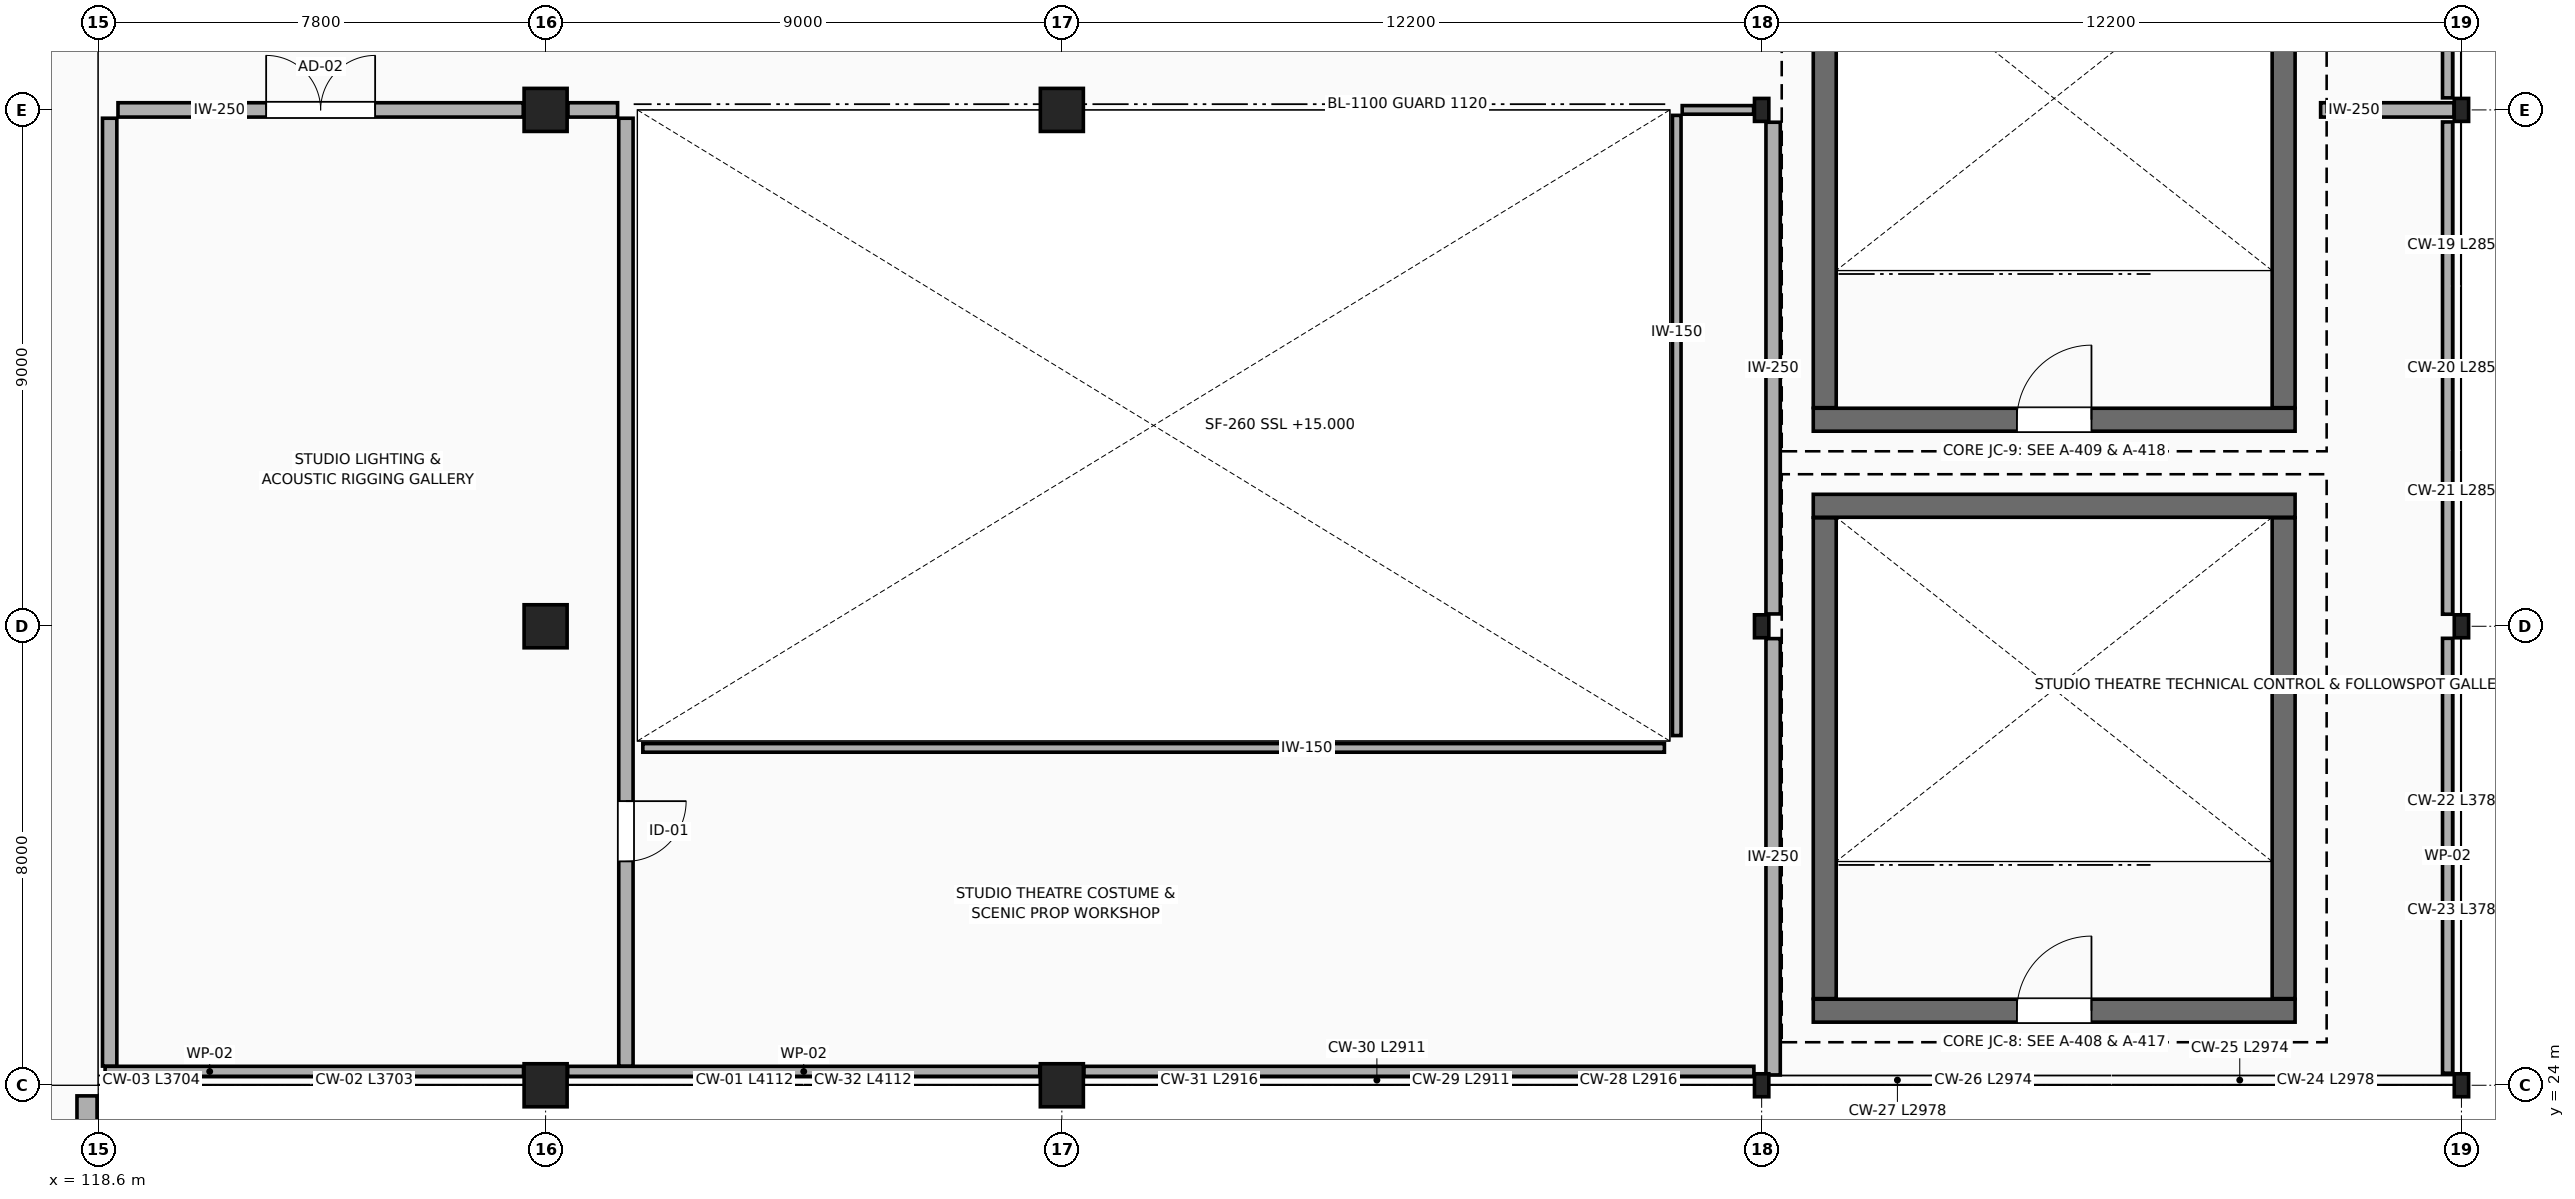
"""IFC4 building model, lengths in metres.
Left out: names, types, materials, properties, quantities, classifications, styles, units other than length and angle.
Written with IfcOpenShell. Run it as: python <this file> out.ifc"""

import sys

from ifc_helpers import new_model, si_unit, direction, frame, frame_2d, origin, origin_2d, place, context, subcontext, project, spatial, rectangle, i_section, extrude, element, fill, save


model = new_model("IFC4")
c1 = context("Model", 3, precision=1e-05, world=origin(), true_north=direction((0.0, 1.0)))
c2 = subcontext(c1, "Body", "Model", "MODEL_VIEW")
j1 = project(units=[si_unit("LENGTHUNIT", "METRE"), si_unit("PLANEANGLEUNIT", "RADIAN")], contexts=[c1])
p1 = place(None, origin())
s1 = spatial("IfcSite", under=j1, at=p1, CompositionType="ELEMENT")
p2 = place(p1, origin())
s2 = spatial("IfcBuilding", under=s1, at=p2, CompositionType="ELEMENT")
p3 = place(p2, frame((0.0, 0.0, 15.0)))
s3 = spatial("IfcBuildingStorey", under=s2, at=p3, CompositionType="ELEMENT", Elevation=15.0)
for number, where, z_axis, x_axis in (
    (1, (126.4, 24.0, 0.0), (0.0, 0.0, 1.0), (1.0, 0.0, 0.0)),
    (2, (126.4, 32.0, 0.0), (0.0, 0.0, 1.0), (1.0, 0.0, 0.0)),
):
    element("IfcColumn", number, at=place(p3, frame(where, z_axis=z_axis, x_axis=x_axis)), inside=s3, PredefinedType="COLUMN", context=c2, shape_type="SweptSolid", body=[
        extrude(rectangle(XDim=0.75, YDim=0.75, at=origin_2d()), origin(), (0.0, 0.0, 1.0), 4.76),
    ])
for number, where, z_axis, x_axis in (
    (3, (126.4, 41.0, 0.0), (0.0, 0.0, 1.0), (1.0, 0.0, 0.0)),
    (4, (135.4, 24.0, 0.0), (0.0, 0.0, 1.0), (1.0, 0.0, 0.0)),
    (5, (135.4, 41.0, 0.0), (0.0, 0.0, 1.0), (1.0, 0.0, 0.0)),
):
    element("IfcColumn", number, at=place(p3, frame(where, z_axis=z_axis, x_axis=x_axis)), inside=s3, PredefinedType="COLUMN", context=c2, shape_type="SweptSolid", body=[
        extrude(rectangle(XDim=0.75, YDim=0.75, at=origin_2d()), origin(), (0.0, 0.0, 1.0), 4.8),
    ])
for number, where, z_axis, x_axis in (
    (6, (147.6, 24.0, 0.0), (0.0, 0.0, 1.0), (1.0, 0.0, 0.0)),
    (7, (147.6, 32.0, 0.0), (0.0, 0.0, 1.0), (1.0, 0.0, 0.0)),
    (8, (147.6, 41.0, 0.0), (0.0, 0.0, 1.0), (1.0, 0.0, 0.0)),
):
    element("IfcColumn", number, at=place(p3, frame(where, z_axis=z_axis, x_axis=x_axis)), inside=s3, PredefinedType="COLUMN", context=c2, shape_type="SweptSolid", body=[
        extrude(i_section(OverallWidth=0.25, OverallDepth=0.4, WebThickness=0.01, FlangeThickness=0.013, FilletRadius=0.014, at=origin_2d()), origin(), (0.0, 0.0, 1.0), 4.8),
    ])
for number, where, z_axis, x_axis in (
    (9, (159.8, 24.0, 0.0), (0.0, 0.0, 1.0), (1.0, 0.0, 0.0)),
    (10, (159.8, 32.0, 0.0), (0.0, 0.0, 1.0), (1.0, 0.0, 0.0)),
    (11, (159.8, 41.0, 0.0), (0.0, 0.0, 1.0), (1.0, 0.0, 0.0)),
):
    element("IfcColumn", number, at=place(p3, frame(where, z_axis=z_axis, x_axis=x_axis)), inside=s3, PredefinedType="COLUMN", context=c2, shape_type="SweptSolid", body=[
        extrude(i_section(OverallWidth=0.25, OverallDepth=0.4, WebThickness=0.01, FlangeThickness=0.013, FilletRadius=0.014, at=origin_2d()), origin(), (0.0, 0.0, 1.0), 4.76),
    ])
for number, where, z_axis, x_axis in (
    (12, (159.56, 49.79, 0.0), (0.0, 0.0, 1.0), (0.0, -1.0, 0.0)),
    (13, (159.56, 40.79, 0.0), (0.0, 0.0, 1.0), (0.0, -1.0, 0.0)),
):
    element("IfcWall", number, at=place(p3, frame(where, z_axis=z_axis, x_axis=x_axis)), inside=s3, PredefinedType="PARAPET", context=c2, shape_type="SweptSolid", body=[
        extrude(rectangle(XDim=8.58, YDim=0.18, at=frame_2d((4.29, 0.0))), origin(), (0.0, 0.0, 1.0), 0.88),
    ])
p4 = place(p3, frame((159.56, 31.79, 0.0), z_axis=(0.0, 0.0, 1.0), x_axis=(0.0, -1.0, 0.0)))
e14 = element("IfcWall", 14, at=p4, inside=s3, PredefinedType="PARAPET", context=c2, shape_type="SweptSolid", body=[
    extrude(rectangle(XDim=7.58, YDim=0.18, at=frame_2d((3.79, 0.0))), origin(), (0.0, 0.0, 1.0), 0.88),
])
p5 = place(p3, frame((147.465, 24.24, 0.0), z_axis=(0.0, 0.0, 1.0), x_axis=(-1.0, 0.0, 0.0)))
e15 = element("IfcWall", 15, at=p5, inside=s3, PredefinedType="PARAPET", context=c2, shape_type="SweptSolid", body=[
    extrude(rectangle(XDim=11.68, YDim=0.18, at=frame_2d((5.84, 0.0))), origin(), (0.0, 0.0, 1.0), 0.88),
])
p6 = place(p3, frame((135.015, 24.24, 0.0), z_axis=(0.0, 0.0, 1.0), x_axis=(-1.0, 0.0, 0.0)))
e16 = element("IfcWall", 16, at=p6, inside=s3, PredefinedType="PARAPET", context=c2, shape_type="SweptSolid", body=[
    extrude(rectangle(XDim=8.23, YDim=0.18, at=frame_2d((4.115, 0.0))), origin(), (0.0, 0.0, 1.0), 0.88),
])
p7 = place(p3, frame((126.015, 24.24, 0.0), z_axis=(0.0, 0.0, 1.0), x_axis=(-1.0, 0.0, 0.0)))
e17 = element("IfcWall", 17, at=p7, inside=s3, PredefinedType="PARAPET", context=c2, shape_type="SweptSolid", body=[
    extrude(rectangle(XDim=7.295, YDim=0.18, at=frame_2d((3.647, 0.0))), origin(), (0.0, 0.0, 1.0), 0.88),
])
p8 = place(p3, frame((118.405, 23.815, 0.0), z_axis=(0.0, 0.0, 1.0), x_axis=(0.0, -1.0, 0.0)))
e18 = element("IfcWall", 18, at=p8, inside=s3, PredefinedType="STANDARD", context=c2, shape_type="SweptSolid", body=[
    extrude(rectangle(XDim=13.63, YDim=0.35, at=frame_2d((6.815, 0.0))), origin(), (0.0, 0.0, 1.0), 3.735),
])
p9 = place(p3, frame((148.5, 25.3, 0.0), z_axis=(0.0, 0.0, 1.0), x_axis=(1.0, 0.0, 0.0)))
e19 = element("IfcWall", 19, at=p9, inside=s3, PredefinedType="SHEAR", context=c2, shape_type="SweptSolid", body=[
    extrude(rectangle(XDim=8.4, YDim=0.4, at=frame_2d((4.2, 0.0))), origin(), (0.0, 0.0, 1.0), 4.58),
])
p10 = place(p9, frame((3.55, 0.0, 0.0)))
e20 = element("IfcOpeningElement", 20, at=p10, cuts=e19, PredefinedType="OPENING", context=c2, shape_type="SweptSolid", body=[
    extrude(rectangle(XDim=1.3, YDim=2.15, at=frame_2d((0.65, 1.075))), frame((0.0, 0.21, 0.0), z_axis=(0.0, -1.0, 0.0), x_axis=(1.0, 0.0, 0.0)), (0.0, 0.0, 1.0), 0.42),
])
p11 = place(p3, frame((156.9, 34.1, 0.0), z_axis=(0.0, 0.0, 1.0), x_axis=(-1.0, 0.0, 0.0)))
e21 = element("IfcWall", 21, at=p11, inside=s3, PredefinedType="SHEAR", context=c2, shape_type="SweptSolid", body=[
    extrude(rectangle(XDim=8.4, YDim=0.4, at=frame_2d((4.2, 0.0))), origin(), (0.0, 0.0, 1.0), 4.58),
])
for number, where, z_axis, x_axis in (
    (22, (156.7, 25.51, 0.0), (0.0, 0.0, 1.0), (0.0, 1.0, 0.0)),
    (23, (148.7, 33.89, 0.0), (0.0, 0.0, 1.0), (0.0, -1.0, 0.0)),
):
    element("IfcWall", number, at=place(p3, frame(where, z_axis=z_axis, x_axis=x_axis)), inside=s3, PredefinedType="SHEAR", context=c2, shape_type="SweptSolid", body=[
        extrude(rectangle(XDim=8.38, YDim=0.4, at=frame_2d((4.19, 0.0))), origin(), (0.0, 0.0, 1.0), 4.58),
    ])
p12 = place(p3, frame((148.5, 35.6, 0.0), z_axis=(0.0, 0.0, 1.0), x_axis=(1.0, 0.0, 0.0)))
e24 = element("IfcWall", 24, at=p12, inside=s3, PredefinedType="SHEAR", context=c2, shape_type="SweptSolid", body=[
    extrude(rectangle(XDim=8.4, YDim=0.4, at=frame_2d((4.2, 0.0))), origin(), (0.0, 0.0, 1.0), 4.58),
])
p13 = place(p12, frame((3.55, 0.0, 0.0)))
e25 = element("IfcOpeningElement", 25, at=p13, cuts=e24, PredefinedType="OPENING", context=c2, shape_type="SweptSolid", body=[
    extrude(rectangle(XDim=1.3, YDim=2.15, at=frame_2d((0.65, 1.075))), frame((0.0, 0.21, 0.0), z_axis=(0.0, -1.0, 0.0), x_axis=(1.0, 0.0, 0.0)), (0.0, 0.0, 1.0), 0.42),
])
for number, where, z_axis, x_axis in (
    (26, (156.7, 35.81, 0.0), (0.0, 0.0, 1.0), (0.0, 1.0, 0.0)),
    (27, (148.7, 44.19, 0.0), (0.0, 0.0, 1.0), (0.0, -1.0, 0.0)),
):
    element("IfcWall", number, at=place(p3, frame(where, z_axis=z_axis, x_axis=x_axis)), inside=s3, PredefinedType="SHEAR", context=c2, shape_type="SweptSolid", body=[
        extrude(rectangle(XDim=8.38, YDim=0.4, at=frame_2d((4.19, 0.0))), origin(), (0.0, 0.0, 1.0), 4.58),
    ])
p14 = place(p3, frame((147.8, 24.18, 0.0), z_axis=(0.0, 0.0, 1.0), x_axis=(0.0, 1.0, 0.0)))
e28 = element("IfcWall", 28, at=p14, inside=s3, PredefinedType="PARTITIONING", context=c2, shape_type="SweptSolid", body=[
    extrude(rectangle(XDim=7.605, YDim=0.25, at=frame_2d((3.802, 0.0))), origin(), (0.0, 0.0, 1.0), 4.57),
])
p15 = place(p3, frame((147.8, 32.215, 0.0), z_axis=(0.0, 0.0, 1.0), x_axis=(0.0, 1.0, 0.0)))
e29 = element("IfcWall", 29, at=p15, inside=s3, PredefinedType="PARTITIONING", context=c2, shape_type="SweptSolid", body=[
    extrude(rectangle(XDim=8.57, YDim=0.25, at=frame_2d((4.285, 0.0))), origin(), (0.0, 0.0, 1.0), 4.57),
])
p16 = place(p3, frame((157.345, 41.0, 0.0), z_axis=(0.0, 0.0, 1.0), x_axis=(1.0, 0.0, 0.0)))
e30 = element("IfcWall", 30, at=p16, inside=s3, PredefinedType="PARTITIONING", context=c2, shape_type="SweptSolid", body=[
    extrude(rectangle(XDim=2.326, YDim=0.25, at=frame_2d((1.163, 0.0))), origin(), (0.0, 0.0, 1.0), 3.98),
])
p17 = place(p3, frame((118.945, 41.0, 0.0), z_axis=(0.0, 0.0, 1.0), x_axis=(1.0, 0.0, 0.0)))
e31 = element("IfcWall", 31, at=p17, inside=s3, PredefinedType="PARTITIONING", context=c2, shape_type="SweptSolid", body=[
    extrude(rectangle(XDim=7.065, YDim=0.25, at=frame_2d((3.532, 0.0))), origin(), (0.0, 0.0, 1.0), 3.87),
])
p18 = place(p17, frame((2.583, 0.0, 0.0)))
e32 = element("IfcOpeningElement", 32, at=p18, cuts=e31, PredefinedType="OPENING", context=c2, shape_type="SweptSolid", body=[
    extrude(rectangle(XDim=1.9, YDim=2.35, at=frame_2d((0.95, 1.175))), frame((0.0, 0.135, 0.0), z_axis=(0.0, -1.0, 0.0), x_axis=(1.0, 0.0, 0.0)), (0.0, 0.0, 1.0), 0.27),
])
p19 = place(p3, frame((126.79, 41.0, 0.0), z_axis=(0.0, 0.0, 1.0), x_axis=(1.0, 0.0, 0.0)))
e33 = element("IfcWall", 33, at=p19, inside=s3, PredefinedType="PARTITIONING", context=c2, shape_type="SweptSolid", body=[
    extrude(rectangle(XDim=0.865, YDim=0.25, at=frame_2d((0.433, 0.0))), origin(), (0.0, 0.0, 1.0), 4.07),
])
p20 = place(p3, frame((127.8, 40.855, 0.0), z_axis=(0.0, 0.0, 1.0), x_axis=(0.0, -1.0, 0.0)))
e34 = element("IfcWall", 34, at=p20, inside=s3, PredefinedType="PARTITIONING", context=c2, shape_type="SweptSolid", body=[
    extrude(rectangle(XDim=16.521, YDim=0.25, at=frame_2d((8.26, 0.0))), origin(), (0.0, 0.0, 1.0), 4.53),
])
p21 = place(p20, frame((11.903, 0.0, 0.0)))
e35 = element("IfcOpeningElement", 35, at=p21, cuts=e34, PredefinedType="OPENING", context=c2, shape_type="SweptSolid", body=[
    extrude(rectangle(XDim=1.05, YDim=2.15, at=frame_2d((0.525, 1.075))), frame((0.0, 0.135, 0.0), z_axis=(0.0, -1.0, 0.0), x_axis=(1.0, 0.0, 0.0)), (0.0, 0.0, 1.0), 0.27),
])
p22 = place(p3, frame((118.8, 24.334, 0.0), z_axis=(0.0, 0.0, 1.0), x_axis=(0.0, 1.0, 0.0)))
e36 = element("IfcWall", 36, at=p22, inside=s3, PredefinedType="PARTITIONING", context=c2, shape_type="SweptSolid", body=[
    extrude(rectangle(XDim=16.521, YDim=0.25, at=frame_2d((8.26, 0.0))), origin(), (0.0, 0.0, 1.0), 3.73),
])
p23 = place(p3, frame((128.095, 29.88, 0.0), z_axis=(0.0, 0.0, 1.0), x_axis=(1.0, 0.0, 0.0)))
e37 = element("IfcWall", 37, at=p23, inside=s3, PredefinedType="PARTITIONING", context=c2, shape_type="SweptSolid", body=[
    extrude(rectangle(XDim=17.81, YDim=0.15, at=frame_2d((8.905, 0.0))), origin(), (0.0, 0.0, 1.0), 4.53),
])
p24 = place(p3, frame((146.12, 30.095, 0.0), z_axis=(0.0, 0.0, 1.0), x_axis=(0.0, 1.0, 0.0)))
e38 = element("IfcWall", 38, at=p24, inside=s3, PredefinedType="PARTITIONING", context=c2, shape_type="SweptSolid", body=[
    extrude(rectangle(XDim=10.81, YDim=0.15, at=frame_2d((5.405, 0.0))), origin(), (0.0, 0.0, 1.0), 4.8),
])
p25 = place(p3, frame((146.215, 41.0, 0.0), z_axis=(0.0, 0.0, 1.0), x_axis=(1.0, 0.0, 0.0)))
e39 = element("IfcWall", 39, at=p25, inside=s3, PredefinedType="PARTITIONING", context=c2, shape_type="SweptSolid", body=[
    extrude(rectangle(XDim=1.245, YDim=0.15, at=frame_2d((0.623, 0.0))), origin(), (0.0, 0.0, 1.0), 3.92),
])
p26 = place(p10, origin())
e40 = element("IfcDoor", 40, at=p26, inside=s3, OperationType="SINGLE_SWING_RIGHT", PredefinedType="DOOR", context=c2, shape_type="SweptSolid", body=[
    extrude(rectangle(XDim=1.3, YDim=2.15, at=frame_2d((0.65, 1.075))), frame((0.0, 0.025, 0.0), z_axis=(0.0, -1.0, 0.0), x_axis=(1.0, 0.0, 0.0)), (0.0, 0.0, 1.0), 0.05),
])
fill(e20, e40)
p27 = place(p13, origin())
e41 = element("IfcDoor", 41, at=p27, inside=s3, OperationType="SINGLE_SWING_RIGHT", PredefinedType="DOOR", context=c2, shape_type="SweptSolid", body=[
    extrude(rectangle(XDim=1.3, YDim=2.15, at=frame_2d((0.65, 1.075))), frame((0.0, 0.025, 0.0), z_axis=(0.0, -1.0, 0.0), x_axis=(1.0, 0.0, 0.0)), (0.0, 0.0, 1.0), 0.05),
])
fill(e25, e41)
p28 = place(p18, origin())
e42 = element("IfcDoor", 42, at=p28, inside=s3, OperationType="DOUBLE_SWING_RIGHT", PredefinedType="DOOR", context=c2, shape_type="SweptSolid", body=[
    extrude(rectangle(XDim=1.9, YDim=2.35, at=frame_2d((0.95, 1.175))), frame((0.0, 0.025, 0.0), z_axis=(0.0, -1.0, 0.0), x_axis=(1.0, 0.0, 0.0)), (0.0, 0.0, 1.0), 0.05),
])
fill(e32, e42)
p29 = place(p21, origin())
e43 = element("IfcDoor", 43, at=p29, inside=s3, OperationType="SINGLE_SWING_LEFT", PredefinedType="DOOR", context=c2, shape_type="SweptSolid", body=[
    extrude(rectangle(XDim=1.05, YDim=2.15, at=frame_2d((0.525, 1.075))), frame((0.0, 0.025, 0.0), z_axis=(0.0, -1.0, 0.0), x_axis=(1.0, 0.0, 0.0)), (0.0, 0.0, 1.0), 0.05),
])
fill(e35, e43)
save(model, sys.argv[1])
